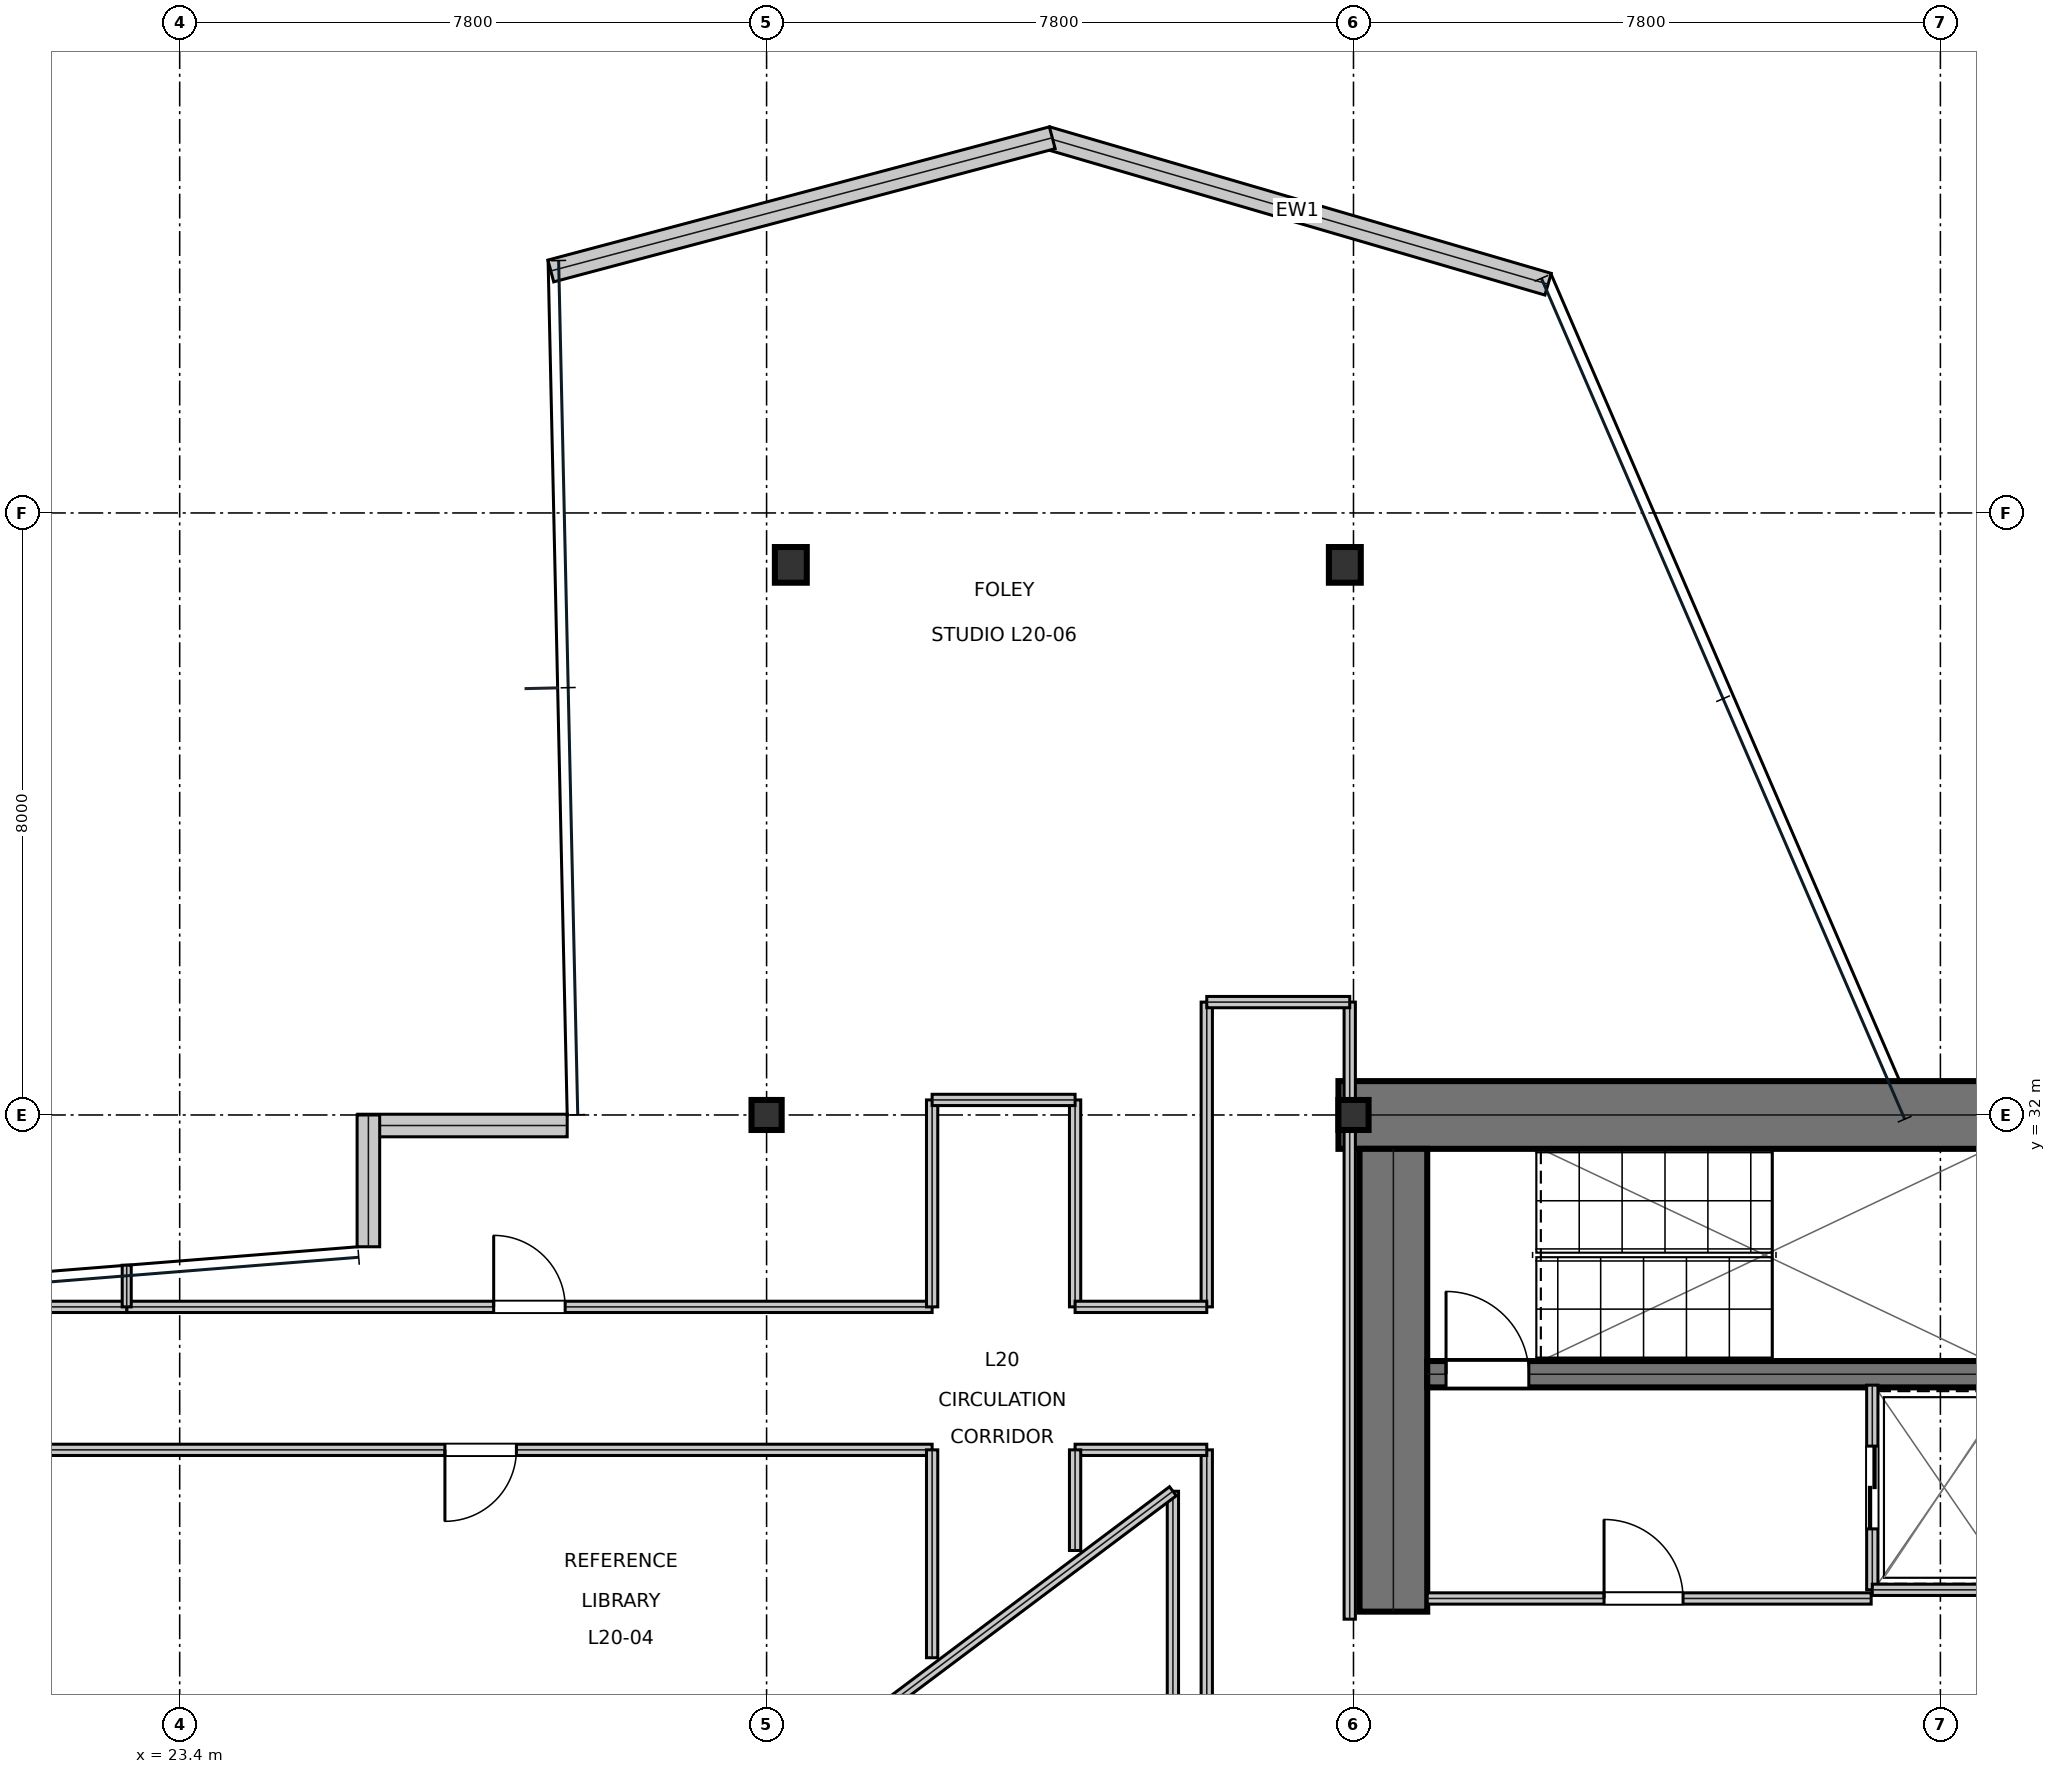
"""IFC4 building model, lengths in metres.
Left out: names, types, materials, properties, quantities, classifications, styles, units other than length and angle.
Written with IfcOpenShell. Run it as: python <this file> out.ifc"""

import sys

from ifc_helpers import new_model, si_unit, direction, frame, frame_2d, origin, origin_2d, place, context, subcontext, project, spatial, rectangle, i_section, extrude, element, fill, save


model = new_model("IFC4")
c1 = context("Model", 3, precision=1e-05, world=origin(), true_north=direction((0.0, 1.0)))
c2 = subcontext(c1, "Body", "Model", "MODEL_VIEW")
j1 = project(units=[si_unit("LENGTHUNIT", "METRE"), si_unit("PLANEANGLEUNIT", "RADIAN")], contexts=[c1])
p1 = place(None, origin())
s1 = spatial("IfcSite", under=j1, at=p1, CompositionType="ELEMENT")
p2 = place(p1, origin())
s2 = spatial("IfcBuilding", under=s1, at=p2, CompositionType="ELEMENT")
p3 = place(p2, frame((0.0, 0.0, 90.45)))
s3 = spatial("IfcBuildingStorey", under=s2, at=p3, CompositionType="ELEMENT", Elevation=90.45)
p4 = place(p3, frame((38.8, 32.0, 0.0), z_axis=(0.0, 0.0, 1.0), x_axis=(1.0, 0.0, 0.0)))
e1 = element("IfcWall", 1, at=p4, inside=s3, PredefinedType="SHEAR", context=c2, shape_type="SweptSolid", body=[
    extrude(rectangle(XDim=16.0, YDim=0.9, at=frame_2d((8.0, 0.0))), origin(), (0.0, 0.0, 1.0), 3.81),
])
p5 = place(p3, frame((39.53, 25.4, 0.0), z_axis=(0.0, 0.0, 1.0), x_axis=(0.0, 1.0, 0.0)))
e2 = element("IfcWall", 2, at=p5, inside=s3, PredefinedType="SHEAR", context=c2, shape_type="SweptSolid", body=[
    extrude(rectangle(XDim=6.15, YDim=0.9, at=frame_2d((3.075, 0.0))), origin(), (0.0, 0.0, 1.0), 3.81),
])
p6 = place(p3, frame((39.98, 28.555, 0.0), z_axis=(0.0, 0.0, 1.0), x_axis=(1.0, 0.0, 0.0)))
e3 = element("IfcWall", 3, at=p6, inside=s3, PredefinedType="SHEAR", context=c2, shape_type="SweptSolid", body=[
    extrude(rectangle(XDim=7.71, YDim=0.35, at=frame_2d((3.855, 0.0))), origin(), (0.0, 0.0, 1.0), 3.81),
])
p7 = place(p6, frame((0.25, 0.0, 0.0)))
e4 = element("IfcOpeningElement", 4, at=p7, cuts=e3, PredefinedType="OPENING", context=c2, shape_type="SweptSolid", body=[
    extrude(rectangle(XDim=1.1, YDim=2.15, at=frame_2d((0.55, 1.075))), frame((0.0, 0.185, 0.0), z_axis=(0.0, -1.0, 0.0), x_axis=(1.0, 0.0, 0.0)), (0.0, 0.0, 1.0), 0.37),
])
for number, where, z_axis, x_axis in (
    (5, (31.2, 32.0, 0.0), (0.0, 0.0, 1.0), (1.0, 0.0, 0.0)),
    (6, (39.0, 32.0, 0.0), (0.0, 0.0, 1.0), (1.0, 0.0, 0.0)),
):
    element("IfcColumn", number, at=place(p3, frame(where, z_axis=z_axis, x_axis=x_axis)), inside=s3, PredefinedType="COLUMN", context=c2, shape_type="SweptSolid", body=[
        extrude(i_section(OverallWidth=0.401, OverallDepth=0.399, WebThickness=0.025, FlangeThickness=0.04, at=origin_2d()), origin(), (0.0, 0.0, 1.0), 4.044),
    ])
p8 = place(p3, frame((31.522, 39.31, 0.016), z_axis=(0.013907491862, -0.029879851512, 0.999456740506), x_axis=(0.906606370736, 0.421977355485, 0.0)))
e7 = element("IfcColumn", 7, at=p8, inside=s3, PredefinedType="COLUMN", context=c2, shape_type="SweptSolid", body=[
    extrude(i_section(OverallWidth=0.424, OverallDepth=0.474, WebThickness=0.048, FlangeThickness=0.077, at=origin_2d()), origin(), (0.0, 0.0, 1.0), 4.02),
])
p9 = place(p3, frame((38.885, 39.31, 0.016), z_axis=(-0.004980395162, -0.029882370973, 0.999541014451), x_axis=(0.986393923832, -0.164398987305, 0.0)))
e8 = element("IfcColumn", 8, at=p9, inside=s3, PredefinedType="COLUMN", context=c2, shape_type="SweptSolid", body=[
    extrude(i_section(OverallWidth=0.424, OverallDepth=0.474, WebThickness=0.048, FlangeThickness=0.077, at=origin_2d()), origin(), (0.0, 0.0, 1.0), 4.02),
])
p10 = place(p3, frame((41.586, 43.04, 0.0), z_axis=(0.0, 0.0, 1.0), x_axis=(-0.95987901055, 0.280414488045, 0.0)))
e9 = element("IfcWall", 9, at=p10, inside=s3, PredefinedType="STANDARD", context=c2, shape_type="SweptSolid", body=[
    extrude(rectangle(XDim=6.943, YDim=0.3, at=frame_2d((3.472, 0.0))), origin(), (0.0, 0.0, 1.0), 3.81),
])
p11 = place(p3, frame((34.997, 44.986, 0.0), z_axis=(0.0, 0.0, 1.0), x_axis=(-0.966505300828, -0.256646651002, 0.0)))
e10 = element("IfcWall", 10, at=p11, inside=s3, PredefinedType="STANDARD", context=c2, shape_type="SweptSolid", body=[
    extrude(rectangle(XDim=6.896, YDim=0.3, at=frame_2d((3.448, 0.0))), origin(), (0.0, 0.0, 1.0), 3.81),
])
p12 = place(p3, frame((28.55, 31.86, 0.0), z_axis=(0.0, 0.0, 1.0), x_axis=(-1.0, 0.0, 0.0)))
e11 = element("IfcWall", 11, at=p12, inside=s3, PredefinedType="STANDARD", context=c2, shape_type="SweptSolid", body=[
    extrude(rectangle(XDim=2.782, YDim=0.3, at=frame_2d((1.391, 0.0))), origin(), (0.0, 0.0, 1.0), 3.81),
])
p13 = place(p3, frame((25.908, 32.0, 0.0), z_axis=(0.0, 0.0, 1.0), x_axis=(0.0, -1.0, 0.0)))
e12 = element("IfcWall", 12, at=p13, inside=s3, PredefinedType="STANDARD", context=c2, shape_type="SweptSolid", body=[
    extrude(rectangle(XDim=1.751, YDim=0.3, at=frame_2d((0.875, 0.0))), origin(), (0.0, 0.0, 1.0), 3.338),
])
p14 = place(p3, frame((39.98, 25.575, 0.0), z_axis=(0.0, 0.0, 1.0), x_axis=(1.0, 0.0, 0.0)))
e13 = element("IfcWall", 13, at=p14, inside=s3, PredefinedType="PARTITIONING", context=c2, shape_type="SweptSolid", body=[
    extrude(rectangle(XDim=5.9, YDim=0.15, at=frame_2d((2.95, 0.0))), origin(), (0.0, 0.0, 1.0), 3.81),
])
p15 = place(p14, frame((2.35, 0.0, 0.0)))
e14 = element("IfcOpeningElement", 14, at=p15, cuts=e13, PredefinedType="OPENING", context=c2, shape_type="SweptSolid", body=[
    extrude(rectangle(XDim=1.05, YDim=2.15, at=frame_2d((0.525, 1.075))), frame((0.0, 0.085, 0.0), z_axis=(0.0, -1.0, 0.0), x_axis=(1.0, 0.0, 0.0)), (0.0, 0.0, 1.0), 0.17),
])
p16 = place(p3, frame((45.895, 25.69, 0.0), z_axis=(0.0, 0.0, 1.0), x_axis=(0.0, 1.0, 0.0)))
e15 = element("IfcWall", 15, at=p16, inside=s3, PredefinedType="PARTITIONING", context=c2, shape_type="SweptSolid", body=[
    extrude(rectangle(XDim=2.72, YDim=0.15, at=frame_2d((1.36, 0.0))), origin(), (0.0, 0.0, 1.0), 3.81),
])
p17 = place(p16, frame((0.81, 0.0, 0.0)))
e16 = element("IfcOpeningElement", 16, at=p17, cuts=e15, PredefinedType="OPENING", context=c2, shape_type="SweptSolid", body=[
    extrude(rectangle(XDim=1.1, YDim=2.15, at=frame_2d((0.55, 1.075))), frame((0.0, 0.085, 0.0), z_axis=(0.0, -1.0, 0.0), x_axis=(1.0, 0.0, 0.0)), (0.0, 0.0, 1.0), 0.17),
])
p18 = place(p3, frame((45.895, 25.69, 0.0), z_axis=(0.0, 0.0, 1.0), x_axis=(1.0, 0.0, 0.0)))
e17 = element("IfcWall", 17, at=p18, inside=s3, PredefinedType="PARTITIONING", context=c2, shape_type="SweptSolid", body=[
    extrude(rectangle(XDim=1.915, YDim=0.15, at=frame_2d((0.958, 0.0))), origin(), (0.0, 0.0, 1.0), 3.81),
])
p19 = place(p3, frame((37.05, 14.5, 0.0), z_axis=(0.0, 0.0, 1.0), x_axis=(0.0, 1.0, 0.0)))
e18 = element("IfcWall", 18, at=p19, inside=s3, PredefinedType="PARTITIONING", context=c2, shape_type="SweptSolid", body=[
    extrude(rectangle(XDim=13.05, YDim=0.15, at=frame_2d((6.525, 0.0))), origin(), (0.0, 0.0, 1.0), 3.181),
])
p20 = place(p19, frame((4.61, 0.0, 0.0)))
e19 = element("IfcOpeningElement", 19, at=p20, cuts=e18, PredefinedType="OPENING", context=c2, shape_type="SweptSolid", body=[
    extrude(rectangle(XDim=0.95, YDim=2.15, at=frame_2d((0.475, 1.075))), frame((0.0, 0.085, 0.0), z_axis=(0.0, -1.0, 0.0), x_axis=(1.0, 0.0, 0.0)), (0.0, 0.0, 1.0), 0.17),
])
p21 = place(p3, frame((21.4, 27.55, 0.0), z_axis=(0.0, 0.0, 1.0), x_axis=(1.0, 0.0, 0.0)))
e20 = element("IfcWall", 20, at=p21, inside=s3, PredefinedType="PARTITIONING", context=c2, shape_type="SweptSolid", body=[
    extrude(rectangle(XDim=12.0, YDim=0.15, at=frame_2d((6.0, 0.0))), origin(), (0.0, 0.0, 1.0), 3.181),
])
p22 = place(p21, frame((5.525, 0.0, 0.0)))
e21 = element("IfcOpeningElement", 21, at=p22, cuts=e20, PredefinedType="OPENING", context=c2, shape_type="SweptSolid", body=[
    extrude(rectangle(XDim=0.95, YDim=2.15, at=frame_2d((0.475, 1.075))), frame((0.0, 0.085, 0.0), z_axis=(0.0, -1.0, 0.0), x_axis=(1.0, 0.0, 0.0)), (0.0, 0.0, 1.0), 0.17),
])
p23 = place(p3, frame((22.696, 29.45, 0.0), z_axis=(0.0, 0.0, 1.0), x_axis=(1.0, 0.0, 0.0)))
e22 = element("IfcWall", 22, at=p23, inside=s3, PredefinedType="PARTITIONING", context=c2, shape_type="SweptSolid", body=[
    extrude(rectangle(XDim=10.704, YDim=0.15, at=frame_2d((5.352, 0.0))), origin(), (0.0, 0.0, 1.0), 3.181),
])
p24 = place(p23, frame((4.877, 0.0, 0.0)))
e23 = element("IfcOpeningElement", 23, at=p24, cuts=e22, PredefinedType="OPENING", context=c2, shape_type="SweptSolid", body=[
    extrude(rectangle(XDim=0.95, YDim=2.15, at=frame_2d((0.475, 1.075))), frame((0.0, 0.085, 0.0), z_axis=(0.0, -1.0, 0.0), x_axis=(1.0, 0.0, 0.0)), (0.0, 0.0, 1.0), 0.17),
])
p25 = place(p3, frame((35.3, 27.55, 0.0), z_axis=(0.0, 0.0, 1.0), x_axis=(1.0, 0.0, 0.0)))
e24 = element("IfcWall", 24, at=p25, inside=s3, PredefinedType="PARTITIONING", context=c2, shape_type="SweptSolid", body=[
    extrude(rectangle(XDim=1.75, YDim=0.15, at=frame_2d((0.875, 0.0))), origin(), (0.0, 0.0, 1.0), 3.391),
])
p26 = place(p3, frame((35.3, 26.212, 0.0), z_axis=(0.0, 0.0, 1.0), x_axis=(0.0, 1.0, 0.0)))
e25 = element("IfcWall", 25, at=p26, inside=s3, PredefinedType="PARTITIONING", context=c2, shape_type="SweptSolid", body=[
    extrude(rectangle(XDim=1.338, YDim=0.15, at=frame_2d((0.669, 0.0))), origin(), (0.0, 0.0, 1.0), 3.81),
])
p27 = place(p3, frame((33.4, 24.788, 0.0), z_axis=(0.0, 0.0, 1.0), x_axis=(0.0, 1.0, 0.0)))
e26 = element("IfcWall", 26, at=p27, inside=s3, PredefinedType="PARTITIONING", context=c2, shape_type="SweptSolid", body=[
    extrude(rectangle(XDim=2.762, YDim=0.15, at=frame_2d((1.381, 0.0))), origin(), (0.0, 0.0, 1.0), 3.81),
])
p28 = place(p3, frame((15.9, 29.45, 0.0), z_axis=(0.0, 0.0, 1.0), x_axis=(1.0, 0.0, 0.0)))
e27 = element("IfcWall", 27, at=p28, inside=s3, PredefinedType="PARTITIONING", context=c2, shape_type="SweptSolid", body=[
    extrude(rectangle(XDim=6.796, YDim=0.15, at=frame_2d((3.398, 0.0))), origin(), (0.0, 0.0, 1.0), 3.338),
])
p29 = place(p3, frame((38.95, 25.3, 0.0), z_axis=(0.0, 0.0, 1.0), x_axis=(0.0, 1.0, 0.0)))
e28 = element("IfcWall", 28, at=p29, inside=s3, PredefinedType="PARTITIONING", context=c2, shape_type="SweptSolid", body=[
    extrude(rectangle(XDim=8.2, YDim=0.15, at=frame_2d((4.1, 0.0))), origin(), (0.0, 0.0, 1.0), 3.181),
])
p30 = place(p3, frame((37.05, 29.45, 0.0), z_axis=(0.0, 0.0, 1.0), x_axis=(0.0, 1.0, 0.0)))
e29 = element("IfcWall", 29, at=p30, inside=s3, PredefinedType="PARTITIONING", context=c2, shape_type="SweptSolid", body=[
    extrude(rectangle(XDim=4.05, YDim=0.15, at=frame_2d((2.025, 0.0))), origin(), (0.0, 0.0, 1.0), 3.181),
])
for number, where, z_axis, x_axis in (
    (30, (33.4, 29.45, 0.0), (0.0, 0.0, 1.0), (0.0, 1.0, 0.0)),
    (31, (35.3, 29.45, 0.0), (0.0, 0.0, 1.0), (0.0, 1.0, 0.0)),
):
    element("IfcWall", number, at=place(p3, frame(where, z_axis=z_axis, x_axis=x_axis)), inside=s3, PredefinedType="PARTITIONING", context=c2, shape_type="SweptSolid", body=[
        extrude(rectangle(XDim=2.75, YDim=0.15, at=frame_2d((1.375, 0.0))), origin(), (0.0, 0.0, 1.0), 3.181),
    ])
p31 = place(p3, frame((37.05, 33.5, 0.0), z_axis=(0.0, 0.0, 1.0), x_axis=(1.0, 0.0, 0.0)))
e32 = element("IfcWall", 32, at=p31, inside=s3, PredefinedType="PARTITIONING", context=c2, shape_type="SweptSolid", body=[
    extrude(rectangle(XDim=1.9, YDim=0.15, at=frame_2d((0.95, 0.0))), origin(), (0.0, 0.0, 1.0), 3.181),
])
p32 = place(p3, frame((33.4, 32.2, 0.0), z_axis=(0.0, 0.0, 1.0), x_axis=(1.0, 0.0, 0.0)))
e33 = element("IfcWall", 33, at=p32, inside=s3, PredefinedType="PARTITIONING", context=c2, shape_type="SweptSolid", body=[
    extrude(rectangle(XDim=1.9, YDim=0.15, at=frame_2d((0.95, 0.0))), origin(), (0.0, 0.0, 1.0), 3.181),
])
p33 = place(p3, frame((35.3, 29.45, 0.0), z_axis=(0.0, 0.0, 1.0), x_axis=(1.0, 0.0, 0.0)))
e34 = element("IfcWall", 34, at=p33, inside=s3, PredefinedType="PARTITIONING", context=c2, shape_type="SweptSolid", body=[
    extrude(rectangle(XDim=1.75, YDim=0.15, at=frame_2d((0.875, 0.0))), origin(), (0.0, 0.0, 1.0), 3.81),
])
p34 = place(p3, frame((22.696, 29.45, 0.0), z_axis=(0.0, 0.0, 1.0), x_axis=(0.0, 1.0, 0.0)))
e35 = element("IfcWall", 35, at=p34, inside=s3, PredefinedType="PARTITIONING", context=c2, shape_type="SweptSolid", body=[
    extrude(rectangle(XDim=0.554, YDim=0.12, at=frame_2d((0.277, 0.0))), origin(), (0.0, 0.0, 1.0), 3.81),
])
p35 = place(p3, frame((36.6, 21.0, 0.0), z_axis=(0.0, 0.0, 1.0), x_axis=(0.0, 1.0, 0.0)))
e36 = element("IfcWall", 36, at=p35, inside=s3, PredefinedType="MOVABLE", context=c2, shape_type="SweptSolid", body=[
    extrude(rectangle(XDim=6.0, YDim=0.15, at=frame_2d((3.0, 0.0))), origin(), (0.0, 0.0, 1.0), 3.81),
])
p36 = place(p3, frame((36.6, 27.0, 0.0), z_axis=(0.0, 0.0, 1.0), x_axis=(-0.8, -0.6, 0.0)))
e37 = element("IfcWall", 37, at=p36, inside=s3, PredefinedType="MOVABLE", context=c2, shape_type="SweptSolid", body=[
    extrude(rectangle(XDim=5.0, YDim=0.15, at=frame_2d((2.5, 0.0))), origin(), (0.0, 0.0, 1.0), 3.81),
])
p37 = place(p15, origin())
e38 = element("IfcDoor", 38, at=p37, inside=s3, OperationType="SINGLE_SWING_LEFT", PredefinedType="DOOR", context=c2, shape_type="SweptSolid", body=[
    extrude(rectangle(XDim=1.05, YDim=2.15, at=frame_2d((0.525, 1.075))), frame((0.0, 0.025, 0.0), z_axis=(0.0, -1.0, 0.0), x_axis=(1.0, 0.0, 0.0)), (0.0, 0.0, 1.0), 0.05),
])
fill(e14, e38)
p38 = place(p17, frame((1.1, 0.0, 0.0), z_axis=(0.0, 0.0, 1.0), x_axis=(-1.0, 0.0, 0.0)))
e39 = element("IfcDoor", 39, at=p38, inside=s3, OperationType="DOUBLE_DOOR_SLIDING", PredefinedType="DOOR", context=c2, shape_type="SweptSolid", body=[
    extrude(rectangle(XDim=1.1, YDim=2.15, at=frame_2d((0.55, 1.075))), frame((0.0, 0.025, 0.0), z_axis=(0.0, -1.0, 0.0), x_axis=(1.0, 0.0, 0.0)), (0.0, 0.0, 1.0), 0.05),
])
fill(e16, e39)
p39 = place(p22, frame((0.95, 0.0, 0.0), z_axis=(0.0, 0.0, 1.0), x_axis=(-1.0, 0.0, 0.0)))
e40 = element("IfcDoor", 40, at=p39, inside=s3, OperationType="SINGLE_SWING_RIGHT", PredefinedType="DOOR", context=c2, shape_type="SweptSolid", body=[
    extrude(rectangle(XDim=0.95, YDim=2.15, at=frame_2d((0.475, 1.075))), frame((0.0, 0.025, 0.0), z_axis=(0.0, -1.0, 0.0), x_axis=(1.0, 0.0, 0.0)), (0.0, 0.0, 1.0), 0.05),
])
fill(e21, e40)
p40 = place(p24, origin())
e41 = element("IfcDoor", 41, at=p40, inside=s3, OperationType="SINGLE_SWING_LEFT", PredefinedType="DOOR", context=c2, shape_type="SweptSolid", body=[
    extrude(rectangle(XDim=0.95, YDim=2.15, at=frame_2d((0.475, 1.075))), frame((0.0, 0.025, 0.0), z_axis=(0.0, -1.0, 0.0), x_axis=(1.0, 0.0, 0.0)), (0.0, 0.0, 1.0), 0.05),
])
fill(e23, e41)
p41 = place(p7, origin())
e42 = element("IfcDoor", 42, at=p41, inside=s3, OperationType="SINGLE_SWING_LEFT", PredefinedType="DOOR", context=c2, shape_type="SweptSolid", body=[
    extrude(rectangle(XDim=1.1, YDim=2.15, at=frame_2d((0.55, 1.075))), frame((0.0, 0.025, 0.0), z_axis=(0.0, -1.0, 0.0), x_axis=(1.0, 0.0, 0.0)), (0.0, 0.0, 1.0), 0.05),
])
fill(e4, e42)
save(model, sys.argv[1])
